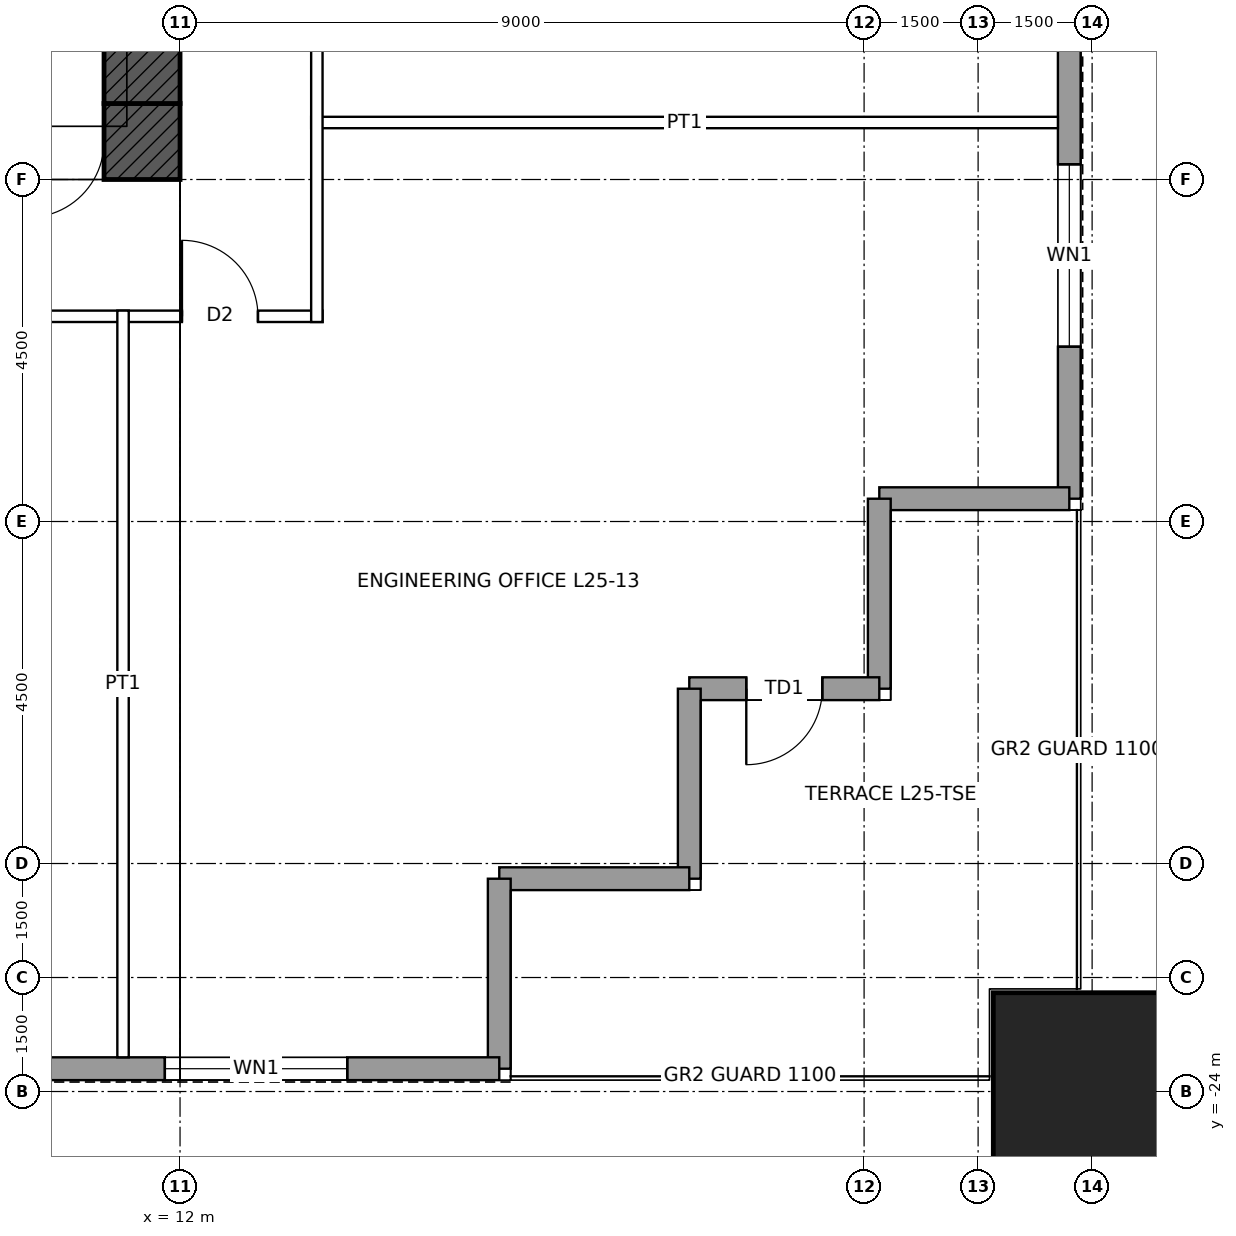
"""IFC4 building model, lengths in metres.
Left out: names, types, materials, properties, quantities, classifications, styles, units other than length and angle.
Written with IfcOpenShell. Run it as: python <this file> out.ifc"""

import sys

from ifc_helpers import new_model, si_unit, direction, frame, frame_2d, origin, origin_2d, place, context, subcontext, project, spatial, rectangle, hollow_rectangle, extrude, element, fill, save


model = new_model("IFC4")
c1 = context("Model", 3, precision=1e-05, world=origin(), true_north=direction((0.0, 1.0)))
c2 = subcontext(c1, "Body", "Model", "MODEL_VIEW")
j1 = project(units=[si_unit("LENGTHUNIT", "METRE"), si_unit("PLANEANGLEUNIT", "RADIAN")], contexts=[c1])
p1 = place(None, origin())
s1 = spatial("IfcSite", under=j1, at=p1, CompositionType="ELEMENT")
p2 = place(p1, origin())
s2 = spatial("IfcBuilding", under=s1, at=p2, CompositionType="ELEMENT")
p3 = place(p2, frame((0.0, 0.0, 126.9)))
s3 = spatial("IfcBuildingStorey", under=s2, at=p3, CompositionType="ELEMENT", Elevation=126.9)
p4 = place(p3, frame((24.0, -24.0, 0.0), z_axis=(0.0, 0.0, 1.0), x_axis=(1.0, 0.0, 0.0)))
e1 = element("IfcColumn", 1, at=p4, inside=s3, PredefinedType="COLUMN", context=c2, shape_type="SweptSolid", body=[
    extrude(hollow_rectangle(XDim=2.6, YDim=2.6, WallThickness=0.13, at=origin_2d()), origin(), (0.0, 0.0, 1.0), 4.5),
])
p5 = place(p3, frame((12.0, -11.5, 0.0), z_axis=(0.0, 0.0, 1.0), x_axis=(-1.0, 0.0, 0.0)))
e2 = element("IfcWall", 2, at=p5, inside=s3, PredefinedType="SHEAR", context=c2, shape_type="SweptSolid", body=[
    extrude(rectangle(XDim=24.0, YDim=1.0, at=frame_2d((12.0, 0.0))), origin(), (0.0, 0.0, 1.0), 4.5),
])
p6 = place(p5, frame((11.5, 0.0, 0.0)))
e3 = element("IfcOpeningElement", 3, at=p6, cuts=e2, PredefinedType="OPENING", context=c2, shape_type="SweptSolid", body=[
    extrude(rectangle(XDim=1.0, YDim=2.1, at=frame_2d((0.5, 1.05))), frame((0.0, 0.51, 0.0), z_axis=(0.0, -1.0, 0.0), x_axis=(1.0, 0.0, 0.0)), (0.0, 0.0, 1.0), 1.02),
])
p7 = place(p5, frame((1.0, 0.0, 0.0)))
e4 = element("IfcOpeningElement", 4, at=p7, cuts=e2, PredefinedType="OPENING", context=c2, shape_type="SweptSolid", body=[
    extrude(rectangle(XDim=1.0, YDim=2.4, at=frame_2d((0.5, 1.2))), frame((0.0, 0.51, 0.0), z_axis=(0.0, -1.0, 0.0), x_axis=(1.0, 0.0, 0.0)), (0.0, 0.0, 1.0), 1.02),
])
p8 = place(p3, frame((11.5, 11.0, 0.0), z_axis=(0.0, 0.0, 1.0), x_axis=(0.0, -1.0, 0.0)))
e5 = element("IfcWall", 5, at=p8, inside=s3, PredefinedType="SHEAR", context=c2, shape_type="SweptSolid", body=[
    extrude(rectangle(XDim=22.0, YDim=1.0, at=frame_2d((11.0, 0.0))), origin(), (0.0, 0.0, 1.0), 4.5),
])
p9 = place(p8, frame((10.5, 0.0, 0.0)))
e6 = element("IfcOpeningElement", 6, at=p9, cuts=e5, PredefinedType="OPENING", context=c2, shape_type="SweptSolid", body=[
    extrude(rectangle(XDim=1.0, YDim=2.4, at=frame_2d((0.5, 1.2))), frame((0.0, 0.51, 0.0), z_axis=(0.0, -1.0, 0.0), x_axis=(1.0, 0.0, 0.0)), (0.0, 0.0, 1.0), 1.02),
])
p10 = place(p3, frame((23.7, 16.2, 0.0), z_axis=(0.0, 0.0, 1.0), x_axis=(0.0, -1.0, 0.0)))
e7 = element("IfcWall", 7, at=p10, inside=s3, PredefinedType="SOLIDWALL", context=c2, shape_type="SweptSolid", body=[
    extrude(rectangle(XDim=32.4, YDim=0.3, at=frame_2d((16.2, 0.0))), origin(), (0.0, 0.0, 1.0), 4.3),
])
p11 = place(p10, frame((2.0, 0.0, 1.0)))
e8 = element("IfcOpeningElement", 8, at=p11, cuts=e7, PredefinedType="OPENING", context=c2, shape_type="SweptSolid", body=[
    extrude(rectangle(XDim=2.4, YDim=1.2, at=frame_2d((1.2, 0.6))), frame((0.0, 0.16, 0.0), z_axis=(0.0, -1.0, 0.0), x_axis=(1.0, 0.0, 0.0)), (0.0, 0.0, 1.0), 0.32),
])
p12 = place(p10, frame((7.25, 0.0, 1.0)))
e9 = element("IfcOpeningElement", 9, at=p12, cuts=e7, PredefinedType="OPENING", context=c2, shape_type="SweptSolid", body=[
    extrude(rectangle(XDim=2.4, YDim=1.2, at=frame_2d((1.2, 0.6))), frame((0.0, 0.16, 0.0), z_axis=(0.0, -1.0, 0.0), x_axis=(1.0, 0.0, 0.0)), (0.0, 0.0, 1.0), 0.32),
])
p13 = place(p10, frame((9.95, 0.0, 1.0)))
e10 = element("IfcOpeningElement", 10, at=p13, cuts=e7, PredefinedType="OPENING", context=c2, shape_type="SweptSolid", body=[
    extrude(rectangle(XDim=2.4, YDim=1.2, at=frame_2d((1.2, 0.6))), frame((0.0, 0.16, 0.0), z_axis=(0.0, -1.0, 0.0), x_axis=(1.0, 0.0, 0.0)), (0.0, 0.0, 1.0), 0.32),
])
p14 = place(p10, frame((13.0, 0.0, 1.0)))
e11 = element("IfcOpeningElement", 11, at=p14, cuts=e7, PredefinedType="OPENING", context=c2, shape_type="SweptSolid", body=[
    extrude(rectangle(XDim=2.4, YDim=1.2, at=frame_2d((1.2, 0.6))), frame((0.0, 0.16, 0.0), z_axis=(0.0, -1.0, 0.0), x_axis=(1.0, 0.0, 0.0)), (0.0, 0.0, 1.0), 0.32),
])
p15 = place(p10, frame((17.0, 0.0, 1.0)))
e12 = element("IfcOpeningElement", 12, at=p15, cuts=e7, PredefinedType="OPENING", context=c2, shape_type="SweptSolid", body=[
    extrude(rectangle(XDim=2.4, YDim=1.2, at=frame_2d((1.2, 0.6))), frame((0.0, 0.16, 0.0), z_axis=(0.0, -1.0, 0.0), x_axis=(1.0, 0.0, 0.0)), (0.0, 0.0, 1.0), 0.32),
])
p16 = place(p10, frame((20.05, 0.0, 1.0)))
e13 = element("IfcOpeningElement", 13, at=p16, cuts=e7, PredefinedType="OPENING", context=c2, shape_type="SweptSolid", body=[
    extrude(rectangle(XDim=2.4, YDim=1.2, at=frame_2d((1.2, 0.6))), frame((0.0, 0.16, 0.0), z_axis=(0.0, -1.0, 0.0), x_axis=(1.0, 0.0, 0.0)), (0.0, 0.0, 1.0), 0.32),
])
p17 = place(p10, frame((22.75, 0.0, 1.0)))
e14 = element("IfcOpeningElement", 14, at=p17, cuts=e7, PredefinedType="OPENING", context=c2, shape_type="SweptSolid", body=[
    extrude(rectangle(XDim=2.4, YDim=1.2, at=frame_2d((1.2, 0.6))), frame((0.0, 0.16, 0.0), z_axis=(0.0, -1.0, 0.0), x_axis=(1.0, 0.0, 0.0)), (0.0, 0.0, 1.0), 0.32),
])
p18 = place(p10, frame((28.0, 0.0, 1.0)))
e15 = element("IfcOpeningElement", 15, at=p18, cuts=e7, PredefinedType="OPENING", context=c2, shape_type="SweptSolid", body=[
    extrude(rectangle(XDim=2.4, YDim=1.2, at=frame_2d((1.2, 0.6))), frame((0.0, 0.16, 0.0), z_axis=(0.0, -1.0, 0.0), x_axis=(1.0, 0.0, 0.0)), (0.0, 0.0, 1.0), 0.32),
])
for number, where, z_axis, x_axis in (
    (16, (23.7, -16.2, 0.0), (0.0, 0.0, 1.0), (-1.0, 0.0, 0.0)),
    (17, (21.2, -16.2, 0.0), (0.0, 0.0, 1.0), (0.0, -1.0, 0.0)),
):
    element("IfcWall", number, at=place(p3, frame(where, z_axis=z_axis, x_axis=x_axis)), inside=s3, PredefinedType="SOLIDWALL", context=c2, shape_type="SweptSolid", body=[
        extrude(rectangle(XDim=2.5, YDim=0.3, at=frame_2d((1.25, 0.0))), origin(), (0.0, 0.0, 1.0), 4.3),
    ])
p19 = place(p3, frame((21.2, -18.7, 0.0), z_axis=(0.0, 0.0, 1.0), x_axis=(-1.0, 0.0, 0.0)))
e18 = element("IfcWall", 18, at=p19, inside=s3, PredefinedType="SOLIDWALL", context=c2, shape_type="SweptSolid", body=[
    extrude(rectangle(XDim=2.5, YDim=0.3, at=frame_2d((1.25, 0.0))), origin(), (0.0, 0.0, 1.0), 4.3),
])
p20 = place(p19, frame((0.75, 0.0, 0.0)))
e19 = element("IfcOpeningElement", 19, at=p20, cuts=e18, PredefinedType="OPENING", context=c2, shape_type="SweptSolid", body=[
    extrude(rectangle(XDim=1.0, YDim=2.4, at=frame_2d((0.5, 1.2))), frame((0.0, 0.16, 0.0), z_axis=(0.0, -1.0, 0.0), x_axis=(1.0, 0.0, 0.0)), (0.0, 0.0, 1.0), 0.32),
])
for number, where, z_axis, x_axis in (
    (20, (18.7, -18.7, 0.0), (0.0, 0.0, 1.0), (0.0, -1.0, 0.0)),
    (21, (18.7, -21.2, 0.0), (0.0, 0.0, 1.0), (-1.0, 0.0, 0.0)),
    (22, (16.2, -21.2, 0.0), (0.0, 0.0, 1.0), (0.0, -1.0, 0.0)),
):
    element("IfcWall", number, at=place(p3, frame(where, z_axis=z_axis, x_axis=x_axis)), inside=s3, PredefinedType="SOLIDWALL", context=c2, shape_type="SweptSolid", body=[
        extrude(rectangle(XDim=2.5, YDim=0.3, at=frame_2d((1.25, 0.0))), origin(), (0.0, 0.0, 1.0), 4.3),
    ])
p21 = place(p3, frame((16.2, -23.7, 0.0), z_axis=(0.0, 0.0, 1.0), x_axis=(-1.0, 0.0, 0.0)))
e23 = element("IfcWall", 23, at=p21, inside=s3, PredefinedType="SOLIDWALL", context=c2, shape_type="SweptSolid", body=[
    extrude(rectangle(XDim=32.4, YDim=0.3, at=frame_2d((16.2, 0.0))), origin(), (0.0, 0.0, 1.0), 4.3),
])
p22 = place(p21, frame((2.0, 0.0, 1.0)))
e24 = element("IfcOpeningElement", 24, at=p22, cuts=e23, PredefinedType="OPENING", context=c2, shape_type="SweptSolid", body=[
    extrude(rectangle(XDim=2.4, YDim=1.2, at=frame_2d((1.2, 0.6))), frame((0.0, 0.16, 0.0), z_axis=(0.0, -1.0, 0.0), x_axis=(1.0, 0.0, 0.0)), (0.0, 0.0, 1.0), 0.32),
])
p23 = place(p21, frame((7.25, 0.0, 1.0)))
e25 = element("IfcOpeningElement", 25, at=p23, cuts=e23, PredefinedType="OPENING", context=c2, shape_type="SweptSolid", body=[
    extrude(rectangle(XDim=1.8, YDim=1.2, at=frame_2d((0.9, 0.6))), frame((0.0, 0.16, 0.0), z_axis=(0.0, -1.0, 0.0), x_axis=(1.0, 0.0, 0.0)), (0.0, 0.0, 1.0), 0.32),
])
p24 = place(p21, frame((9.5, 0.0, 1.0)))
e26 = element("IfcOpeningElement", 26, at=p24, cuts=e23, PredefinedType="OPENING", context=c2, shape_type="SweptSolid", body=[
    extrude(rectangle(XDim=2.4, YDim=1.2, at=frame_2d((1.2, 0.6))), frame((0.0, 0.16, 0.0), z_axis=(0.0, -1.0, 0.0), x_axis=(1.0, 0.0, 0.0)), (0.0, 0.0, 1.0), 0.32),
])
p25 = place(p21, frame((13.0, 0.0, 1.0)))
e27 = element("IfcOpeningElement", 27, at=p25, cuts=e23, PredefinedType="OPENING", context=c2, shape_type="SweptSolid", body=[
    extrude(rectangle(XDim=2.4, YDim=1.2, at=frame_2d((1.2, 0.6))), frame((0.0, 0.16, 0.0), z_axis=(0.0, -1.0, 0.0), x_axis=(1.0, 0.0, 0.0)), (0.0, 0.0, 1.0), 0.32),
])
p26 = place(p21, frame((17.0, 0.0, 1.0)))
e28 = element("IfcOpeningElement", 28, at=p26, cuts=e23, PredefinedType="OPENING", context=c2, shape_type="SweptSolid", body=[
    extrude(rectangle(XDim=2.4, YDim=1.2, at=frame_2d((1.2, 0.6))), frame((0.0, 0.16, 0.0), z_axis=(0.0, -1.0, 0.0), x_axis=(1.0, 0.0, 0.0)), (0.0, 0.0, 1.0), 0.32),
])
p27 = place(p21, frame((20.5, 0.0, 1.0)))
e29 = element("IfcOpeningElement", 29, at=p27, cuts=e23, PredefinedType="OPENING", context=c2, shape_type="SweptSolid", body=[
    extrude(rectangle(XDim=2.4, YDim=1.2, at=frame_2d((1.2, 0.6))), frame((0.0, 0.16, 0.0), z_axis=(0.0, -1.0, 0.0), x_axis=(1.0, 0.0, 0.0)), (0.0, 0.0, 1.0), 0.32),
])
p28 = place(p21, frame((23.35, 0.0, 1.0)))
e30 = element("IfcOpeningElement", 30, at=p28, cuts=e23, PredefinedType="OPENING", context=c2, shape_type="SweptSolid", body=[
    extrude(rectangle(XDim=1.8, YDim=1.2, at=frame_2d((0.9, 0.6))), frame((0.0, 0.16, 0.0), z_axis=(0.0, -1.0, 0.0), x_axis=(1.0, 0.0, 0.0)), (0.0, 0.0, 1.0), 0.32),
])
p29 = place(p21, frame((28.0, 0.0, 1.0)))
e31 = element("IfcOpeningElement", 31, at=p29, cuts=e23, PredefinedType="OPENING", context=c2, shape_type="SweptSolid", body=[
    extrude(rectangle(XDim=2.4, YDim=1.2, at=frame_2d((1.2, 0.6))), frame((0.0, 0.16, 0.0), z_axis=(0.0, -1.0, 0.0), x_axis=(1.0, 0.0, 0.0)), (0.0, 0.0, 1.0), 0.32),
])
p30 = place(p3, frame((-13.875, -13.8, 0.0), z_axis=(0.0, 0.0, 1.0), x_axis=(1.0, 0.0, 0.0)))
e32 = element("IfcWall", 32, at=p30, inside=s3, PredefinedType="PARTITIONING", context=c2, shape_type="SweptSolid", body=[
    extrude(rectangle(XDim=27.75, YDim=0.15, at=frame_2d((13.875, 0.0))), origin(), (0.0, 0.0, 1.0), 4.3),
])
p31 = place(p30, frame((20.475, 0.0, 0.0)))
e33 = element("IfcOpeningElement", 33, at=p31, cuts=e32, PredefinedType="OPENING", context=c2, shape_type="SweptSolid", body=[
    extrude(rectangle(XDim=1.8, YDim=2.4, at=frame_2d((0.9, 1.2))), frame((0.0, 0.085, 0.0), z_axis=(0.0, -1.0, 0.0), x_axis=(1.0, 0.0, 0.0)), (0.0, 0.0, 1.0), 0.17),
])
p32 = place(p30, frame((10.525, 0.0, 0.0)))
e34 = element("IfcOpeningElement", 34, at=p32, cuts=e32, PredefinedType="OPENING", context=c2, shape_type="SweptSolid", body=[
    extrude(rectangle(XDim=1.8, YDim=2.4, at=frame_2d((0.9, 1.2))), frame((0.0, 0.085, 0.0), z_axis=(0.0, -1.0, 0.0), x_axis=(1.0, 0.0, 0.0)), (0.0, 0.0, 1.0), 0.17),
])
p33 = place(p30, frame((5.475, 0.0, 0.0)))
e35 = element("IfcOpeningElement", 35, at=p33, cuts=e32, PredefinedType="OPENING", context=c2, shape_type="SweptSolid", body=[
    extrude(rectangle(XDim=1.8, YDim=2.4, at=frame_2d((0.9, 1.2))), frame((0.0, 0.085, 0.0), z_axis=(0.0, -1.0, 0.0), x_axis=(1.0, 0.0, 0.0)), (0.0, 0.0, 1.0), 0.17),
])
p34 = place(p30, frame((25.9, 0.0, 0.0)))
e36 = element("IfcOpeningElement", 36, at=p34, cuts=e32, PredefinedType="OPENING", context=c2, shape_type="SweptSolid", body=[
    extrude(rectangle(XDim=1.0, YDim=2.1, at=frame_2d((0.5, 1.05))), frame((0.0, 0.085, 0.0), z_axis=(0.0, -1.0, 0.0), x_axis=(1.0, 0.0, 0.0)), (0.0, 0.0, 1.0), 0.17),
])
p35 = place(p30, frame((0.85, 0.0, 0.0)))
e37 = element("IfcOpeningElement", 37, at=p35, cuts=e32, PredefinedType="OPENING", context=c2, shape_type="SweptSolid", body=[
    extrude(rectangle(XDim=1.0, YDim=2.1, at=frame_2d((0.5, 1.05))), frame((0.0, 0.085, 0.0), z_axis=(0.0, -1.0, 0.0), x_axis=(1.0, 0.0, 0.0)), (0.0, 0.0, 1.0), 0.17),
])
for number, where, z_axis, x_axis in (
    (38, (13.725, -11.25, 0.0), (0.0, 0.0, 1.0), (1.0, 0.0, 0.0)),
    (39, (11.25, -23.55, 0.0), (0.0, 0.0, 1.0), (0.0, 1.0, 0.0)),
):
    element("IfcWall", number, at=place(p3, frame(where, z_axis=z_axis, x_axis=x_axis)), inside=s3, PredefinedType="PARTITIONING", context=c2, shape_type="SweptSolid", body=[
        extrude(rectangle(XDim=9.825, YDim=0.15, at=frame_2d((4.913, 0.0))), origin(), (0.0, 0.0, 1.0), 3.431),
    ])
p36 = place(p3, frame((13.8, -13.875, 0.0), z_axis=(0.0, 0.0, 1.0), x_axis=(0.0, 1.0, 0.0)))
e40 = element("IfcWall", 40, at=p36, inside=s3, PredefinedType="PARTITIONING", context=c2, shape_type="SweptSolid", body=[
    extrude(rectangle(XDim=27.75, YDim=0.15, at=frame_2d((13.875, 0.0))), origin(), (0.0, 0.0, 1.0), 4.3),
])
p37 = place(p36, frame((20.875, 0.0, 0.0)))
e41 = element("IfcOpeningElement", 41, at=p37, cuts=e40, PredefinedType="OPENING", context=c2, shape_type="SweptSolid", body=[
    extrude(rectangle(XDim=1.0, YDim=2.1, at=frame_2d((0.5, 1.05))), frame((0.0, 0.085, 0.0), z_axis=(0.0, -1.0, 0.0), x_axis=(1.0, 0.0, 0.0)), (0.0, 0.0, 1.0), 0.17),
])
p38 = place(p36, frame((9.225, 0.0, 0.0)))
e42 = element("IfcOpeningElement", 42, at=p38, cuts=e40, PredefinedType="OPENING", context=c2, shape_type="SweptSolid", body=[
    extrude(rectangle(XDim=1.8, YDim=2.4, at=frame_2d((0.9, 1.2))), frame((0.0, 0.085, 0.0), z_axis=(0.0, -1.0, 0.0), x_axis=(1.0, 0.0, 0.0)), (0.0, 0.0, 1.0), 0.17),
])
p39 = place(p18, origin())
e43 = element("IfcWindow", 43, at=p39, inside=s3, PartitioningType="SINGLE_PANEL", PredefinedType="WINDOW", context=c2, shape_type="SweptSolid", body=[
    extrude(rectangle(XDim=2.4, YDim=1.2, at=frame_2d((1.2, 0.6))), frame((0.0, 0.03, 0.0), z_axis=(0.0, -1.0, 0.0), x_axis=(1.0, 0.0, 0.0)), (0.0, 0.0, 1.0), 0.06),
])
fill(e15, e43)
p40 = place(p20, origin())
e44 = element("IfcDoor", 44, at=p40, inside=s3, OperationType="SINGLE_SWING_RIGHT", PredefinedType="DOOR", context=c2, shape_type="SweptSolid", body=[
    extrude(rectangle(XDim=1.0, YDim=2.4, at=frame_2d((0.5, 1.2))), frame((0.0, 0.025, 0.0), z_axis=(0.0, -1.0, 0.0), x_axis=(1.0, 0.0, 0.0)), (0.0, 0.0, 1.0), 0.05),
])
fill(e19, e44)
p41 = place(p22, origin())
e45 = element("IfcWindow", 45, at=p41, inside=s3, PartitioningType="SINGLE_PANEL", PredefinedType="WINDOW", context=c2, shape_type="SweptSolid", body=[
    extrude(rectangle(XDim=2.4, YDim=1.2, at=frame_2d((1.2, 0.6))), frame((0.0, 0.03, 0.0), z_axis=(0.0, -1.0, 0.0), x_axis=(1.0, 0.0, 0.0)), (0.0, 0.0, 1.0), 0.06),
])
fill(e24, e45)
p42 = place(p7, origin())
e46 = element("IfcDoor", 46, at=p42, inside=s3, OperationType="SINGLE_SWING_RIGHT", PredefinedType="DOOR", context=c2, shape_type="SweptSolid", body=[
    extrude(rectangle(XDim=1.0, YDim=2.4, at=frame_2d((0.5, 1.2))), frame((0.0, 0.485, 0.0), z_axis=(0.0, -1.0, 0.0), x_axis=(1.0, 0.0, 0.0)), (0.0, 0.0, 1.0), 0.05),
])
fill(e4, e46)
p43 = place(p34, origin())
e47 = element("IfcDoor", 47, at=p43, inside=s3, OperationType="SINGLE_SWING_LEFT", PredefinedType="DOOR", context=c2, shape_type="SweptSolid", body=[
    extrude(rectangle(XDim=1.0, YDim=2.1, at=frame_2d((0.5, 1.05))), frame((0.0, 0.025, 0.0), z_axis=(0.0, -1.0, 0.0), x_axis=(1.0, 0.0, 0.0)), (0.0, 0.0, 1.0), 0.05),
])
fill(e36, e47)
save(model, sys.argv[1])
